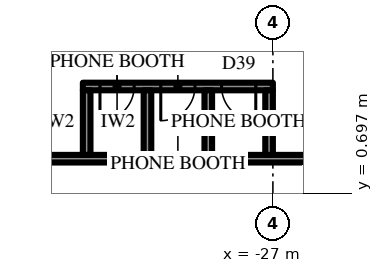
"""IFC4 building model, lengths in metres.
Left out: names, types, materials, properties, quantities, classifications, styles, units other than length and angle.
Written with IfcOpenShell. Run it as: python <this file> out.ifc"""

import sys

from ifc_helpers import new_model, si_unit, direction, frame, frame_2d, origin, place, context, subcontext, project, spatial, rectangle, extrude, element, fill, save


model = new_model("IFC4")
c1 = context("Model", 3, precision=1e-05, world=origin(), true_north=direction((0.0, 1.0)))
c2 = subcontext(c1, "Body", "Model", "MODEL_VIEW")
j1 = project(units=[si_unit("LENGTHUNIT", "METRE"), si_unit("PLANEANGLEUNIT", "RADIAN")], contexts=[c1])
p1 = place(None, origin())
s1 = spatial("IfcSite", under=j1, at=p1, CompositionType="ELEMENT")
p2 = place(p1, origin())
s2 = spatial("IfcBuilding", under=s1, at=p2, CompositionType="ELEMENT")
p3 = place(p2, frame((0.0, 0.0, 82.3)))
s3 = spatial("IfcBuildingStorey", under=s2, at=p3, CompositionType="ELEMENT", Elevation=82.3)
p4 = place(p3, frame((-21.1, 1.6, 0.0), z_axis=(0.0, 0.0, 1.0), x_axis=(-1.0, 0.0, 0.0)))
e1 = element("IfcWall", 1, at=p4, inside=s3, PredefinedType="PARTITIONING", context=c2, shape_type="SweptSolid", body=[
    extrude(rectangle(XDim=15.273, YDim=0.2, at=frame_2d((7.636, 0.0))), origin(), (0.0, 0.0, 1.0), 4.0),
])
p5 = place(p4, frame((1.027, 0.0, 0.0)))
e2 = element("IfcOpeningElement", 2, at=p5, cuts=e1, PredefinedType="OPENING", context=c2, shape_type="SweptSolid", body=[
    extrude(rectangle(XDim=1.0, YDim=2.2, at=frame_2d((0.5, 1.1))), frame((0.0, 0.11, 0.0), z_axis=(0.0, -1.0, 0.0), x_axis=(1.0, 0.0, 0.0)), (0.0, 0.0, 1.0), 0.22),
])
p6 = place(p3, frame((-27.0, 3.5, 0.0), z_axis=(0.0, 0.0, 1.0), x_axis=(-1.0, 0.0, 0.0)))
e3 = element("IfcWall", 3, at=p6, inside=s3, PredefinedType="PARTITIONING", context=c2, shape_type="SweptSolid", body=[
    extrude(rectangle(XDim=5.0, YDim=0.2, at=frame_2d((2.5, 0.0))), origin(), (0.0, 0.0, 1.0), 4.0),
])
p7 = place(p6, frame((0.45, 0.0, 0.0)))
e4 = element("IfcOpeningElement", 4, at=p7, cuts=e3, PredefinedType="OPENING", context=c2, shape_type="SweptSolid", body=[
    extrude(rectangle(XDim=0.9, YDim=2.2, at=frame_2d((0.45, 1.1))), frame((0.0, 0.11, 0.0), z_axis=(0.0, -1.0, 0.0), x_axis=(1.0, 0.0, 0.0)), (0.0, 0.0, 1.0), 0.22),
])
p8 = place(p6, frame((2.05, 0.0, 0.0)))
e5 = element("IfcOpeningElement", 5, at=p8, cuts=e3, PredefinedType="OPENING", context=c2, shape_type="SweptSolid", body=[
    extrude(rectangle(XDim=0.9, YDim=2.2, at=frame_2d((0.45, 1.1))), frame((0.0, 0.11, 0.0), z_axis=(0.0, -1.0, 0.0), x_axis=(1.0, 0.0, 0.0)), (0.0, 0.0, 1.0), 0.22),
])
p9 = place(p6, frame((3.65, 0.0, 0.0)))
e6 = element("IfcOpeningElement", 6, at=p9, cuts=e3, PredefinedType="OPENING", context=c2, shape_type="SweptSolid", body=[
    extrude(rectangle(XDim=0.9, YDim=2.2, at=frame_2d((0.45, 1.1))), frame((0.0, 0.11, 0.0), z_axis=(0.0, -1.0, 0.0), x_axis=(1.0, 0.0, 0.0)), (0.0, 0.0, 1.0), 0.22),
])
for number, where, z_axis, x_axis in (
    (7, (-27.1, 1.7, 0.0), (0.0, 0.0, 1.0), (0.0, 1.0, 0.0)),
    (8, (-28.7, 1.7, 0.0), (0.0, 0.0, 1.0), (0.0, 1.0, 0.0)),
    (9, (-30.3, 1.7, 0.0), (0.0, 0.0, 1.0), (0.0, 1.0, 0.0)),
    (10, (-31.9, 1.7, 0.0), (0.0, 0.0, 1.0), (0.0, 1.0, 0.0)),
):
    element("IfcWall", number, at=place(p3, frame(where, z_axis=z_axis, x_axis=x_axis)), inside=s3, PredefinedType="PARTITIONING", context=c2, shape_type="SweptSolid", body=[
        extrude(rectangle(XDim=1.7, YDim=0.2, at=frame_2d((0.85, 0.0))), origin(), (0.0, 0.0, 1.0), 4.0),
    ])
p10 = place(p7, origin())
e11 = element("IfcDoor", 11, at=p10, inside=s3, OperationType="SINGLE_SWING_RIGHT", PredefinedType="DOOR", context=c2, shape_type="SweptSolid", body=[
    extrude(rectangle(XDim=0.9, YDim=2.2, at=frame_2d((0.45, 1.1))), frame((0.0, 0.025, 0.0), z_axis=(0.0, -1.0, 0.0), x_axis=(1.0, 0.0, 0.0)), (0.0, 0.0, 1.0), 0.05),
])
fill(e4, e11)
p11 = place(p8, origin())
e12 = element("IfcDoor", 12, at=p11, inside=s3, OperationType="SINGLE_SWING_LEFT", PredefinedType="DOOR", context=c2, shape_type="SweptSolid", body=[
    extrude(rectangle(XDim=0.9, YDim=2.2, at=frame_2d((0.45, 1.1))), frame((0.0, 0.025, 0.0), z_axis=(0.0, -1.0, 0.0), x_axis=(1.0, 0.0, 0.0)), (0.0, 0.0, 1.0), 0.05),
])
fill(e5, e12)
p12 = place(p9, origin())
e13 = element("IfcDoor", 13, at=p12, inside=s3, OperationType="SINGLE_SWING_LEFT", PredefinedType="DOOR", context=c2, shape_type="SweptSolid", body=[
    extrude(rectangle(XDim=0.9, YDim=2.2, at=frame_2d((0.45, 1.1))), frame((0.0, 0.025, 0.0), z_axis=(0.0, -1.0, 0.0), x_axis=(1.0, 0.0, 0.0)), (0.0, 0.0, 1.0), 0.05),
])
fill(e6, e13)
save(model, sys.argv[1])
